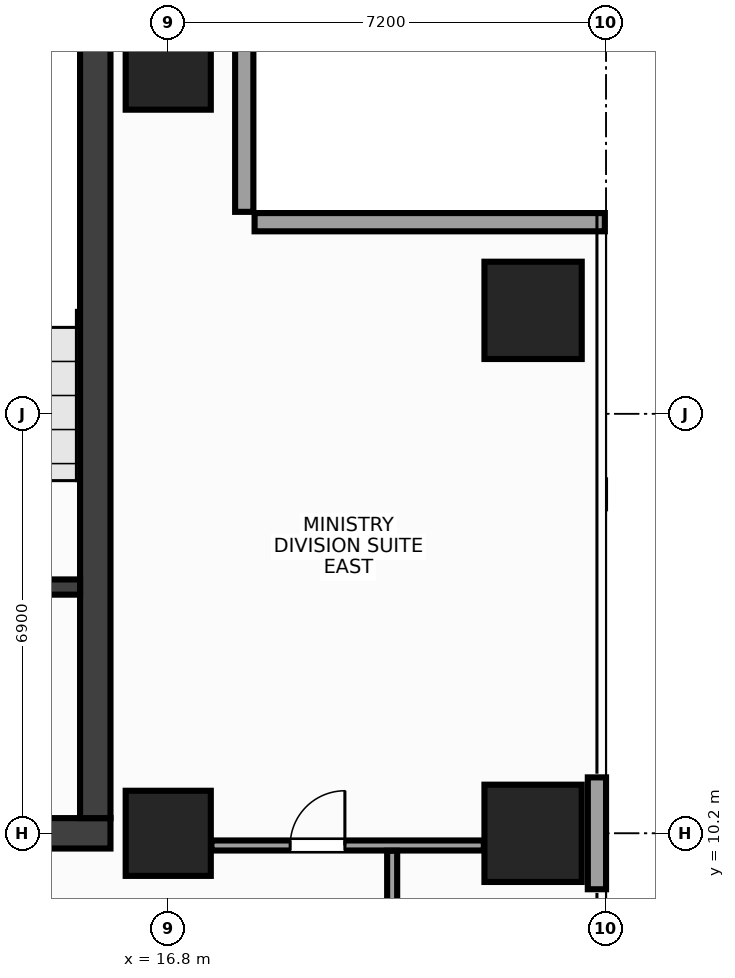
"""IFC4 building model, lengths in metres.
Left out: names, types, materials, properties, quantities, classifications, styles, units other than length and angle.
Written with IfcOpenShell. Run it as: python <this file> out.ifc"""

import sys

from ifc_helpers import new_model, si_unit, direction, frame, frame_2d, origin, origin_2d, place, context, subcontext, project, spatial, rectangle, extrude, source, transform, mapped, element, fill, save


model = new_model("IFC4")
c1 = context("Model", 3, precision=1e-05, world=origin(), true_north=direction((0.0, 1.0)))
c2 = subcontext(c1, "Body", "Model", "MODEL_VIEW")
j1 = project(units=[si_unit("LENGTHUNIT", "METRE"), si_unit("PLANEANGLEUNIT", "RADIAN")], contexts=[c1])
p1 = place(None, origin())
s1 = spatial("IfcSite", under=j1, at=p1, CompositionType="ELEMENT")
p2 = place(p1, origin())
s2 = spatial("IfcBuilding", under=s1, at=p2, CompositionType="ELEMENT")
p3 = place(p2, frame((0.0, 0.0, 221.6)))
s3 = spatial("IfcBuildingStorey", under=s2, at=p3, CompositionType="ELEMENT", Elevation=221.6)
m1 = source(origin(), c2, "Body", "SweptSolid", [
    extrude(rectangle(XDim=31.7, YDim=0.5, at=frame_2d((15.85, 0.0))), origin(), (0.0, 0.0, 1.0), 3.6),
])
p4 = place(p3, frame((-15.85, 10.2, 0.0), z_axis=(0.0, 0.0, 1.0), x_axis=(1.0, 0.0, 0.0)))
e1 = element("IfcWall", 1, at=p4, inside=s3, PredefinedType="SHEAR", context=c2, shape_type="MappedRepresentation", body=[
    mapped(m1, transform((0.0, 0.0, 0.0), x_axis=(1.0, 0.0, 0.0), y_axis=(0.0, 1.0, 0.0), z_axis=(0.0, 0.0, 1.0), scale=1.0)),
])
p5 = place(p4, frame((1.7, 0.0, 0.0)))
e2 = element("IfcOpeningElement", 2, at=p5, cuts=e1, PredefinedType="OPENING", context=c2, shape_type="SweptSolid", body=[
    extrude(rectangle(XDim=1.6, YDim=2.15, at=frame_2d((0.8, 1.075))), frame((0.0, 0.262, 0.0), z_axis=(0.0, -1.0, 0.0), x_axis=(1.0, 0.0, 0.0)), (0.0, 0.0, 1.0), 0.524),
])
p6 = place(p4, frame((28.4, 0.0, 0.0)))
e3 = element("IfcOpeningElement", 3, at=p6, cuts=e1, PredefinedType="OPENING", context=c2, shape_type="SweptSolid", body=[
    extrude(rectangle(XDim=1.6, YDim=2.15, at=frame_2d((0.8, 1.075))), frame((0.0, 0.262, 0.0), z_axis=(0.0, -1.0, 0.0), x_axis=(1.0, 0.0, 0.0)), (0.0, 0.0, 1.0), 0.524),
])
p7 = place(p4, frame((15.1, 0.0, 0.0)))
e4 = element("IfcOpeningElement", 4, at=p7, cuts=e1, PredefinedType="OPENING", context=c2, shape_type="SweptSolid", body=[
    extrude(rectangle(XDim=1.5, YDim=2.2, at=frame_2d((0.75, 1.1))), frame((0.0, 0.262, 0.0), z_axis=(0.0, -1.0, 0.0), x_axis=(1.0, 0.0, 0.0)), (0.0, 0.0, 1.0), 0.524),
])
m2 = source(origin(), c2, "Body", "SweptSolid", [
    extrude(rectangle(XDim=13.1, YDim=0.5, at=frame_2d((6.55, 0.0))), origin(), (0.0, 0.0, 1.0), 3.6),
])
p8 = place(p3, frame((15.6, 10.45, 0.0), z_axis=(0.0, 0.0, 1.0), x_axis=(0.0, 1.0, 0.0)))
e5 = element("IfcWall", 5, at=p8, inside=s3, PredefinedType="SHEAR", context=c2, shape_type="MappedRepresentation", body=[
    mapped(m2, transform((0.0, 0.0, 0.0), x_axis=(1.0, 0.0, 0.0), y_axis=(0.0, 1.0, 0.0), z_axis=(0.0, 0.0, 1.0), scale=1.0)),
])
m3 = source(origin(), c2, "Body", "SweptSolid", [
    extrude(rectangle(XDim=3.705, YDim=0.25, at=frame_2d((1.853, 0.0))), origin(), (0.0, 0.0, 1.0), 3.6),
])
p9 = place(p3, frame((11.645, 14.25, 0.0), z_axis=(0.0, 0.0, 1.0), x_axis=(1.0, 0.0, 0.0)))
e6 = element("IfcWall", 6, at=p9, inside=s3, PredefinedType="SHEAR", context=c2, shape_type="MappedRepresentation", body=[
    mapped(m3, transform((0.0, 0.0, 0.0), x_axis=(1.0, 0.0, 0.0), y_axis=(0.0, 1.0, 0.0), z_axis=(0.0, 0.0, 1.0), scale=1.0)),
])
p10 = place(p9, frame((0.95, 0.0, 0.0)))
e7 = element("IfcOpeningElement", 7, at=p10, cuts=e6, PredefinedType="OPENING", context=c2, shape_type="SweptSolid", body=[
    extrude(rectangle(XDim=1.6, YDim=2.15, at=frame_2d((0.8, 1.075))), frame((0.0, 0.137, 0.0), z_axis=(0.0, -1.0, 0.0), x_axis=(1.0, 0.0, 0.0)), (0.0, 0.0, 1.0), 0.274),
])
m4 = source(origin(), c2, "Body", "SweptSolid", [
    extrude(rectangle(XDim=1.4, YDim=1.4, at=origin_2d()), origin(), (0.0, 0.0, 1.0), 3.6),
])
for number, where, z_axis, x_axis in (
    (8, (16.8, 10.2, 0.0), (0.0, 0.0, 1.0), (1.0, 0.0, 0.0)),
    (9, (16.8, 22.8, 0.0), (0.0, 0.0, 1.0), (1.0, 0.0, 0.0)),
):
    element("IfcColumn", number, at=place(p3, frame(where, z_axis=z_axis, x_axis=x_axis)), inside=s3, PredefinedType="COLUMN", context=c2, shape_type="MappedRepresentation", body=[
        mapped(m4, transform((0.0, 0.0, 0.0), x_axis=(1.0, 0.0, 0.0), y_axis=(0.0, 1.0, 0.0), z_axis=(0.0, 0.0, 1.0), scale=1.0)),
    ])
m5 = source(origin(), c2, "Body", "SweptSolid", [
    extrude(rectangle(XDim=1.6, YDim=1.6, at=origin_2d()), origin(), (0.0, 0.0, 1.0), 3.6),
])
for number, where, z_axis, x_axis in (
    (10, (22.8, 10.2, 0.0), (0.0, 0.0, 1.0), (1.0, 0.0, 0.0)),
    (11, (22.8, 18.8, 0.0), (0.0, 0.0, 1.0), (1.0, 0.0, 0.0)),
):
    element("IfcColumn", number, at=place(p3, frame(where, z_axis=z_axis, x_axis=x_axis)), inside=s3, PredefinedType="COLUMN", context=c2, shape_type="MappedRepresentation", body=[
        mapped(m5, transform((0.0, 0.0, 0.0), x_axis=(1.0, 0.0, 0.0), y_axis=(0.0, 1.0, 0.0), z_axis=(0.0, 0.0, 1.0), scale=1.0)),
    ])
m6 = source(origin(), c2, "Body", "SweptSolid", [
    extrude(rectangle(XDim=1.84, YDim=0.24, at=frame_2d((0.92, 0.0))), origin(), (0.0, 0.0, 1.0), 2.76),
])
p11 = place(p3, frame((23.85, 9.28, 0.0), z_axis=(0.0, 0.0, 1.0), x_axis=(0.0, 1.0, 0.0)))
e12 = element("IfcWall", 12, at=p11, inside=s3, PredefinedType="STANDARD", context=c2, shape_type="MappedRepresentation", body=[
    mapped(m6, transform((0.0, 0.0, 0.0), x_axis=(1.0, 0.0, 0.0), y_axis=(0.0, 1.0, 0.0), z_axis=(0.0, 0.0, 1.0), scale=1.0)),
])
m7 = source(origin(), c2, "Body", "SweptSolid", [
    extrude(rectangle(XDim=5.76, YDim=0.3, at=frame_2d((2.88, 0.0))), origin(), (0.0, 0.0, 1.0), 2.76),
])
p12 = place(p3, frame((23.98, 20.25, 0.0), z_axis=(0.0, 0.0, 1.0), x_axis=(-1.0, 0.0, 0.0)))
e13 = element("IfcWall", 13, at=p12, inside=s3, PredefinedType="STANDARD", context=c2, shape_type="MappedRepresentation", body=[
    mapped(m7, transform((0.0, 0.0, 0.0), x_axis=(1.0, 0.0, 0.0), y_axis=(0.0, 1.0, 0.0), z_axis=(0.0, 0.0, 1.0), scale=1.0)),
])
m8 = source(origin(), c2, "Body", "SweptSolid", [
    extrude(rectangle(XDim=3.56, YDim=0.3, at=frame_2d((1.78, 0.0))), origin(), (0.0, 0.0, 1.0), 2.76),
])
p13 = place(p3, frame((18.05, 20.42, 0.0), z_axis=(0.0, 0.0, 1.0), x_axis=(0.0, 1.0, 0.0)))
e14 = element("IfcWall", 14, at=p13, inside=s3, PredefinedType="STANDARD", context=c2, shape_type="MappedRepresentation", body=[
    mapped(m8, transform((0.0, 0.0, 0.0), x_axis=(1.0, 0.0, 0.0), y_axis=(0.0, 1.0, 0.0), z_axis=(0.0, 0.0, 1.0), scale=1.0)),
])
m9 = source(origin(), c2, "Body", "SweptSolid", [
    extrude(rectangle(XDim=4.48, YDim=0.165, at=frame_2d((2.24, 0.0))), origin(), (0.0, 0.0, 1.0), 2.915),
])
p14 = place(p3, frame((17.51, 10.0, 0.0), z_axis=(0.0, 0.0, 1.0), x_axis=(1.0, 0.0, 0.0)))
e15 = element("IfcWall", 15, at=p14, inside=s3, PredefinedType="PARTITIONING", context=c2, shape_type="MappedRepresentation", body=[
    mapped(m9, transform((0.0, 0.0, 0.0), x_axis=(1.0, 0.0, 0.0), y_axis=(0.0, 1.0, 0.0), z_axis=(0.0, 0.0, 1.0), scale=1.0)),
])
p15 = place(p14, frame((1.295, 0.0, 0.0)))
e16 = element("IfcOpeningElement", 16, at=p15, cuts=e15, PredefinedType="OPENING", context=c2, shape_type="SweptSolid", body=[
    extrude(rectangle(XDim=0.9, YDim=2.15, at=frame_2d((0.45, 1.075))), frame((0.0, 0.094, 0.0), z_axis=(0.0, -1.0, 0.0), x_axis=(1.0, 0.0, 0.0)), (0.0, 0.0, 1.0), 0.189),
])
m10 = source(origin(), c2, "Body", "SweptSolid", [
    extrude(rectangle(XDim=2.358, YDim=0.165, at=frame_2d((1.179, 0.0))), origin(), (0.0, 0.0, 1.0), 3.38),
])
p16 = place(p3, frame((20.482, 7.555, 0.0), z_axis=(0.0, 0.0, 1.0), x_axis=(0.0, 1.0, 0.0)))
e17 = element("IfcWall", 17, at=p16, inside=s3, PredefinedType="PARTITIONING", context=c2, shape_type="MappedRepresentation", body=[
    mapped(m10, transform((0.0, 0.0, 0.0), x_axis=(1.0, 0.0, 0.0), y_axis=(0.0, 1.0, 0.0), z_axis=(0.0, 0.0, 1.0), scale=1.0)),
])
m11 = source(origin(), c2, "Body", "SweptSolid", [
    extrude(rectangle(XDim=0.9, YDim=2.15, at=frame_2d((0.45, 1.075))), frame((0.0, 0.025, 0.0), z_axis=(0.0, -1.0, 0.0), x_axis=(1.0, 0.0, 0.0)), (0.0, 0.0, 1.0), 0.05),
])
p17 = place(p15, origin())
e18 = element("IfcDoor", 18, at=p17, inside=s3, OperationType="SINGLE_SWING_RIGHT", PredefinedType="DOOR", context=c2, shape_type="MappedRepresentation", body=[
    mapped(m11, transform((0.0, 0.0, 0.0), x_axis=(1.0, 0.0, 0.0), y_axis=(0.0, 1.0, 0.0), z_axis=(0.0, 0.0, 1.0), scale=1.0)),
])
fill(e16, e18)
save(model, sys.argv[1])
